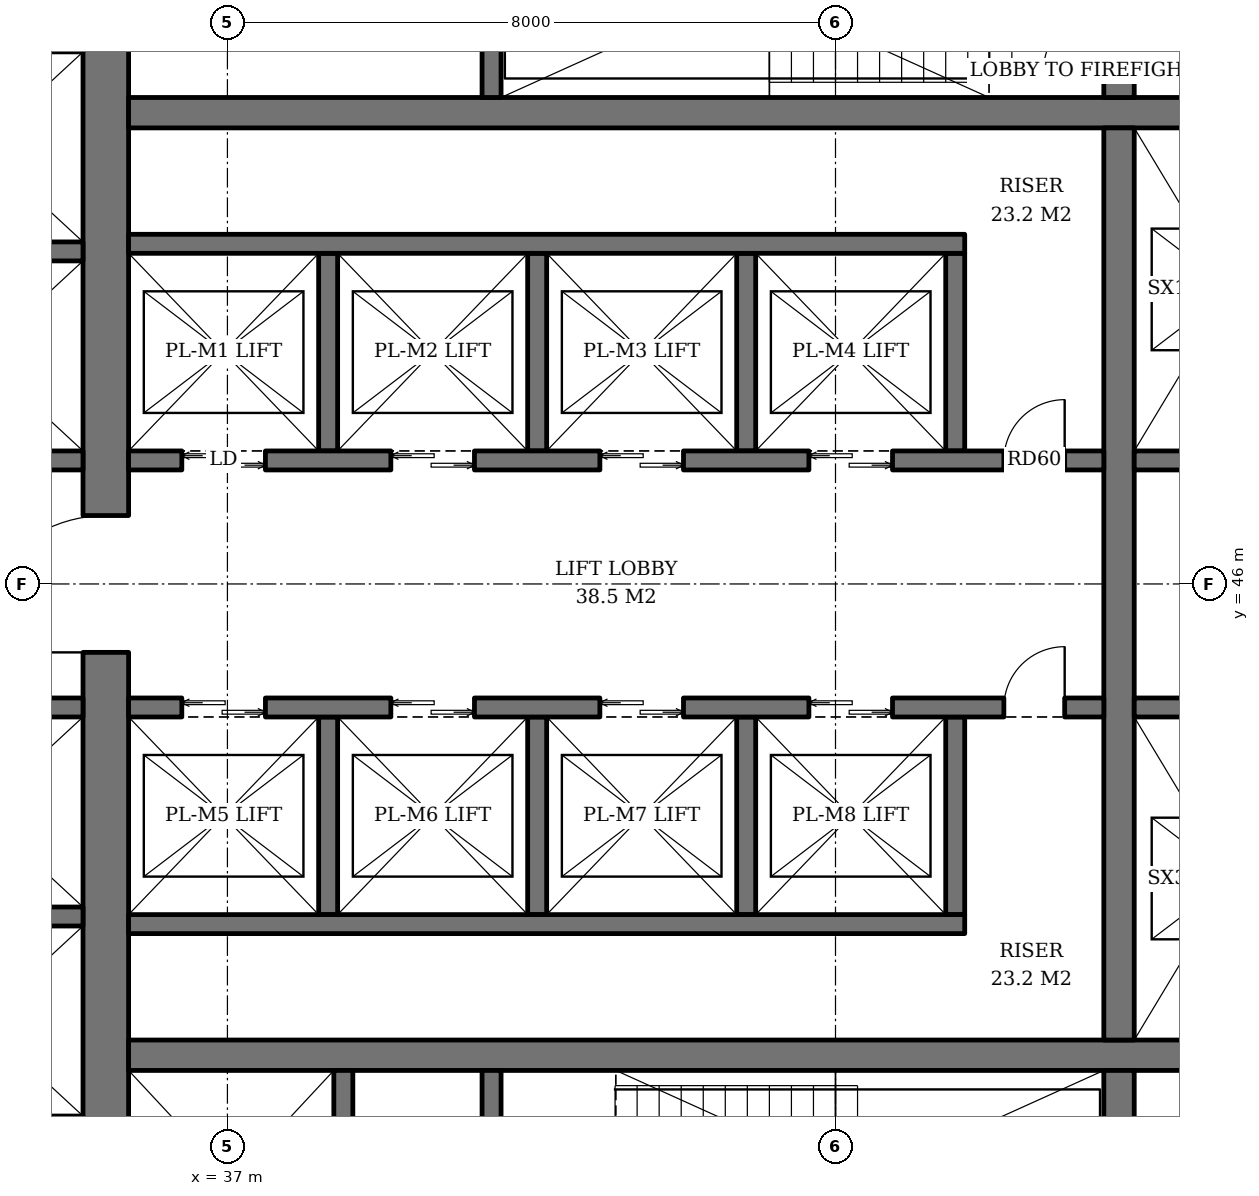
"""IFC4 building model, lengths in metres.
Left out: names, types, materials, properties, quantities, classifications, styles, units other than length and angle.
Written with IfcOpenShell. Run it as: python <this file> out.ifc"""

import sys

from ifc_helpers import new_model, si_unit, direction, frame, frame_2d, origin, place, context, subcontext, project, spatial, rectangle, extrude, element, fill, save


model = new_model("IFC4")
c1 = context("Model", 3, precision=1e-05, world=origin(), true_north=direction((0.0, 1.0)))
c2 = subcontext(c1, "Body", "Model", "MODEL_VIEW")
j1 = project(units=[si_unit("LENGTHUNIT", "METRE"), si_unit("PLANEANGLEUNIT", "RADIAN")], contexts=[c1])
p1 = place(None, origin())
s1 = spatial("IfcSite", under=j1, at=p1, CompositionType="ELEMENT")
p2 = place(p1, origin())
s2 = spatial("IfcBuilding", under=s1, at=p2, CompositionType="ELEMENT")
p3 = place(p2, frame((0.0, 0.0, 89.4)))
s3 = spatial("IfcBuildingStorey", under=s2, at=p3, CompositionType="ELEMENT", Elevation=89.4)
p4 = place(p3, frame((35.4, 36.7, 0.0), z_axis=(0.0, 0.0, 1.0), x_axis=(0.0, 1.0, 0.0)))
e1 = element("IfcWall", 1, at=p4, inside=s3, PredefinedType="SHEAR", context=c2, shape_type="SweptSolid", body=[
    extrude(rectangle(XDim=18.6, YDim=0.6, at=frame_2d((9.3, 0.0))), origin(), (0.0, 0.0, 1.0), 3.8),
])
p5 = place(p4, frame((8.4, 0.0, 0.0)))
e2 = element("IfcOpeningElement", 2, at=p5, cuts=e1, PredefinedType="OPENING", context=c2, shape_type="SweptSolid", body=[
    extrude(rectangle(XDim=1.8, YDim=2.4, at=frame_2d((0.9, 1.2))), frame((0.0, 0.31, 0.0), z_axis=(0.0, -1.0, 0.0), x_axis=(1.0, 0.0, 0.0)), (0.0, 0.0, 1.0), 0.62),
])
for number, where, z_axis, x_axis in (
    (3, (35.7, 39.8, 0.0), (0.0, 0.0, 1.0), (1.0, 0.0, 0.0)),
    (4, (35.7, 52.2, 0.0), (0.0, 0.0, 1.0), (1.0, 0.0, 0.0)),
):
    element("IfcWall", number, at=place(p3, frame(where, z_axis=z_axis, x_axis=x_axis)), inside=s3, PredefinedType="SHEAR", context=c2, shape_type="SweptSolid", body=[
        extrude(rectangle(XDim=18.6, YDim=0.4, at=frame_2d((9.3, 0.0))), origin(), (0.0, 0.0, 1.0), 3.8),
    ])
p6 = place(p3, frame((48.73, 36.7, 0.0), z_axis=(0.0, 0.0, 1.0), x_axis=(0.0, 1.0, 0.0)))
e5 = element("IfcWall", 5, at=p6, inside=s3, PredefinedType="SHEAR", context=c2, shape_type="SweptSolid", body=[
    extrude(rectangle(XDim=2.9, YDim=0.4, at=frame_2d((1.45, 0.0))), origin(), (0.0, 0.0, 1.0), 3.8),
])
p7 = place(p3, frame((48.73, 40.0, 0.0), z_axis=(0.0, 0.0, 1.0), x_axis=(0.0, 1.0, 0.0)))
e6 = element("IfcWall", 6, at=p7, inside=s3, PredefinedType="SHEAR", context=c2, shape_type="SweptSolid", body=[
    extrude(rectangle(XDim=12.0, YDim=0.4, at=frame_2d((6.0, 0.0))), origin(), (0.0, 0.0, 1.0), 3.8),
])
p8 = place(p3, frame((48.73, 52.4, 0.0), z_axis=(0.0, 0.0, 1.0), x_axis=(0.0, 1.0, 0.0)))
e7 = element("IfcWall", 7, at=p8, inside=s3, PredefinedType="SHEAR", context=c2, shape_type="SweptSolid", body=[
    extrude(rectangle(XDim=2.9, YDim=0.4, at=frame_2d((1.45, 0.0))), origin(), (0.0, 0.0, 1.0), 3.8),
])
p9 = place(p8, frame((0.3, 0.0, 0.0)))
e8 = element("IfcOpeningElement", 8, at=p9, cuts=e7, PredefinedType="OPENING", context=c2, shape_type="SweptSolid", body=[
    extrude(rectangle(XDim=1.0, YDim=2.1, at=frame_2d((0.5, 1.05))), frame((0.0, 0.21, 0.0), z_axis=(0.0, -1.0, 0.0), x_axis=(1.0, 0.0, 0.0)), (0.0, 0.0, 1.0), 0.42),
])
p10 = place(p3, frame((38.525, 36.7, 0.0), z_axis=(0.0, 0.0, 1.0), x_axis=(0.0, 1.0, 0.0)))
e9 = element("IfcWall", 9, at=p10, inside=s3, PredefinedType="SHEAR", context=c2, shape_type="SweptSolid", body=[
    extrude(rectangle(XDim=2.9, YDim=0.25, at=frame_2d((1.45, 0.0))), origin(), (0.0, 0.0, 1.0), 3.8),
])
p11 = place(p10, frame((0.8, 0.0, 0.0)))
e10 = element("IfcOpeningElement", 10, at=p11, cuts=e9, PredefinedType="OPENING", context=c2, shape_type="SweptSolid", body=[
    extrude(rectangle(XDim=1.3, YDim=2.2, at=frame_2d((0.65, 1.1))), frame((0.0, 0.135, 0.0), z_axis=(0.0, -1.0, 0.0), x_axis=(1.0, 0.0, 0.0)), (0.0, 0.0, 1.0), 0.27),
])
p12 = place(p3, frame((40.475, 36.7, 0.0), z_axis=(0.0, 0.0, 1.0), x_axis=(0.0, 1.0, 0.0)))
e11 = element("IfcWall", 11, at=p12, inside=s3, PredefinedType="SHEAR", context=c2, shape_type="SweptSolid", body=[
    extrude(rectangle(XDim=2.9, YDim=0.25, at=frame_2d((1.45, 0.0))), origin(), (0.0, 0.0, 1.0), 3.8),
])
p13 = place(p12, frame((0.75, 0.0, 0.0)))
e12 = element("IfcOpeningElement", 12, at=p13, cuts=e11, PredefinedType="OPENING", context=c2, shape_type="SweptSolid", body=[
    extrude(rectangle(XDim=1.2, YDim=2.1, at=frame_2d((0.6, 1.05))), frame((0.0, 0.135, 0.0), z_axis=(0.0, -1.0, 0.0), x_axis=(1.0, 0.0, 0.0)), (0.0, 0.0, 1.0), 0.27),
])
p14 = place(p3, frame((40.475, 52.4, 0.0), z_axis=(0.0, 0.0, 1.0), x_axis=(0.0, 1.0, 0.0)))
e13 = element("IfcWall", 13, at=p14, inside=s3, PredefinedType="SHEAR", context=c2, shape_type="SweptSolid", body=[
    extrude(rectangle(XDim=2.9, YDim=0.25, at=frame_2d((1.45, 0.0))), origin(), (0.0, 0.0, 1.0), 3.8),
])
for number, where, z_axis, x_axis in (
    (14, (38.325, 47.75, 0.0), (0.0, 0.0, 1.0), (0.0, 1.0, 0.0)),
    (15, (41.075, 47.75, 0.0), (0.0, 0.0, 1.0), (0.0, 1.0, 0.0)),
    (16, (43.825, 47.75, 0.0), (0.0, 0.0, 1.0), (0.0, 1.0, 0.0)),
    (17, (46.575, 47.75, 0.0), (0.0, 0.0, 1.0), (0.0, 1.0, 0.0)),
):
    element("IfcWall", number, at=place(p3, frame(where, z_axis=z_axis, x_axis=x_axis)), inside=s3, PredefinedType="SHEAR", context=c2, shape_type="SweptSolid", body=[
        extrude(rectangle(XDim=2.6, YDim=0.25, at=frame_2d((1.3, 0.0))), origin(), (0.0, 0.0, 1.0), 3.8),
    ])
p15 = place(p3, frame((35.7, 50.475, 0.0), z_axis=(0.0, 0.0, 1.0), x_axis=(1.0, 0.0, 0.0)))
e18 = element("IfcWall", 18, at=p15, inside=s3, PredefinedType="SHEAR", context=c2, shape_type="SweptSolid", body=[
    extrude(rectangle(XDim=11.0, YDim=0.25, at=frame_2d((5.5, 0.0))), origin(), (0.0, 0.0, 1.0), 3.8),
])
p16 = place(p3, frame((35.7, 47.625, 0.0), z_axis=(0.0, 0.0, 1.0), x_axis=(1.0, 0.0, 0.0)))
e19 = element("IfcWall", 19, at=p16, inside=s3, PredefinedType="SHEAR", context=c2, shape_type="SweptSolid", body=[
    extrude(rectangle(XDim=12.83, YDim=0.25, at=frame_2d((6.415, 0.0))), origin(), (0.0, 0.0, 1.0), 3.8),
])
p17 = place(p16, frame((0.7, 0.0, 0.0)))
e20 = element("IfcOpeningElement", 20, at=p17, cuts=e19, PredefinedType="OPENING", context=c2, shape_type="SweptSolid", body=[
    extrude(rectangle(XDim=1.1, YDim=2.2, at=frame_2d((0.55, 1.1))), frame((0.0, 0.135, 0.0), z_axis=(0.0, -1.0, 0.0), x_axis=(1.0, 0.0, 0.0)), (0.0, 0.0, 1.0), 0.27),
])
p18 = place(p16, frame((3.45, 0.0, 0.0)))
e21 = element("IfcOpeningElement", 21, at=p18, cuts=e19, PredefinedType="OPENING", context=c2, shape_type="SweptSolid", body=[
    extrude(rectangle(XDim=1.1, YDim=2.2, at=frame_2d((0.55, 1.1))), frame((0.0, 0.135, 0.0), z_axis=(0.0, -1.0, 0.0), x_axis=(1.0, 0.0, 0.0)), (0.0, 0.0, 1.0), 0.27),
])
p19 = place(p16, frame((6.2, 0.0, 0.0)))
e22 = element("IfcOpeningElement", 22, at=p19, cuts=e19, PredefinedType="OPENING", context=c2, shape_type="SweptSolid", body=[
    extrude(rectangle(XDim=1.1, YDim=2.2, at=frame_2d((0.55, 1.1))), frame((0.0, 0.135, 0.0), z_axis=(0.0, -1.0, 0.0), x_axis=(1.0, 0.0, 0.0)), (0.0, 0.0, 1.0), 0.27),
])
p20 = place(p16, frame((8.95, 0.0, 0.0)))
e23 = element("IfcOpeningElement", 23, at=p20, cuts=e19, PredefinedType="OPENING", context=c2, shape_type="SweptSolid", body=[
    extrude(rectangle(XDim=1.1, YDim=2.2, at=frame_2d((0.55, 1.1))), frame((0.0, 0.135, 0.0), z_axis=(0.0, -1.0, 0.0), x_axis=(1.0, 0.0, 0.0)), (0.0, 0.0, 1.0), 0.27),
])
p21 = place(p16, frame((11.515, 0.0, 0.0)))
e24 = element("IfcOpeningElement", 24, at=p21, cuts=e19, PredefinedType="OPENING", context=c2, shape_type="SweptSolid", body=[
    extrude(rectangle(XDim=0.8, YDim=2.0, at=frame_2d((0.4, 1.0))), frame((0.0, 0.135, 0.0), z_axis=(0.0, -1.0, 0.0), x_axis=(1.0, 0.0, 0.0)), (0.0, 0.0, 1.0), 0.27),
])
for number, where, z_axis, x_axis in (
    (25, (38.325, 44.25, 0.0), (0.0, 0.0, 1.0), (0.0, -1.0, 0.0)),
    (26, (41.075, 44.25, 0.0), (0.0, 0.0, 1.0), (0.0, -1.0, 0.0)),
    (27, (43.825, 44.25, 0.0), (0.0, 0.0, 1.0), (0.0, -1.0, 0.0)),
    (28, (46.575, 44.25, 0.0), (0.0, 0.0, 1.0), (0.0, -1.0, 0.0)),
):
    element("IfcWall", number, at=place(p3, frame(where, z_axis=z_axis, x_axis=x_axis)), inside=s3, PredefinedType="SHEAR", context=c2, shape_type="SweptSolid", body=[
        extrude(rectangle(XDim=2.6, YDim=0.25, at=frame_2d((1.3, 0.0))), origin(), (0.0, 0.0, 1.0), 3.8),
    ])
p22 = place(p3, frame((35.7, 41.525, 0.0), z_axis=(0.0, 0.0, 1.0), x_axis=(1.0, 0.0, 0.0)))
e29 = element("IfcWall", 29, at=p22, inside=s3, PredefinedType="SHEAR", context=c2, shape_type="SweptSolid", body=[
    extrude(rectangle(XDim=11.0, YDim=0.25, at=frame_2d((5.5, 0.0))), origin(), (0.0, 0.0, 1.0), 3.8),
])
p23 = place(p3, frame((35.7, 44.375, 0.0), z_axis=(0.0, 0.0, 1.0), x_axis=(1.0, 0.0, 0.0)))
e30 = element("IfcWall", 30, at=p23, inside=s3, PredefinedType="SHEAR", context=c2, shape_type="SweptSolid", body=[
    extrude(rectangle(XDim=12.83, YDim=0.25, at=frame_2d((6.415, 0.0))), origin(), (0.0, 0.0, 1.0), 3.8),
])
p24 = place(p23, frame((0.7, 0.0, 0.0)))
e31 = element("IfcOpeningElement", 31, at=p24, cuts=e30, PredefinedType="OPENING", context=c2, shape_type="SweptSolid", body=[
    extrude(rectangle(XDim=1.1, YDim=2.2, at=frame_2d((0.55, 1.1))), frame((0.0, 0.135, 0.0), z_axis=(0.0, -1.0, 0.0), x_axis=(1.0, 0.0, 0.0)), (0.0, 0.0, 1.0), 0.27),
])
p25 = place(p23, frame((3.45, 0.0, 0.0)))
e32 = element("IfcOpeningElement", 32, at=p25, cuts=e30, PredefinedType="OPENING", context=c2, shape_type="SweptSolid", body=[
    extrude(rectangle(XDim=1.1, YDim=2.2, at=frame_2d((0.55, 1.1))), frame((0.0, 0.135, 0.0), z_axis=(0.0, -1.0, 0.0), x_axis=(1.0, 0.0, 0.0)), (0.0, 0.0, 1.0), 0.27),
])
p26 = place(p23, frame((6.2, 0.0, 0.0)))
e33 = element("IfcOpeningElement", 33, at=p26, cuts=e30, PredefinedType="OPENING", context=c2, shape_type="SweptSolid", body=[
    extrude(rectangle(XDim=1.1, YDim=2.2, at=frame_2d((0.55, 1.1))), frame((0.0, 0.135, 0.0), z_axis=(0.0, -1.0, 0.0), x_axis=(1.0, 0.0, 0.0)), (0.0, 0.0, 1.0), 0.27),
])
p27 = place(p23, frame((8.95, 0.0, 0.0)))
e34 = element("IfcOpeningElement", 34, at=p27, cuts=e30, PredefinedType="OPENING", context=c2, shape_type="SweptSolid", body=[
    extrude(rectangle(XDim=1.1, YDim=2.2, at=frame_2d((0.55, 1.1))), frame((0.0, 0.135, 0.0), z_axis=(0.0, -1.0, 0.0), x_axis=(1.0, 0.0, 0.0)), (0.0, 0.0, 1.0), 0.27),
])
p28 = place(p23, frame((11.515, 0.0, 0.0)))
e35 = element("IfcOpeningElement", 35, at=p28, cuts=e30, PredefinedType="OPENING", context=c2, shape_type="SweptSolid", body=[
    extrude(rectangle(XDim=0.8, YDim=2.0, at=frame_2d((0.4, 1.0))), frame((0.0, 0.135, 0.0), z_axis=(0.0, -1.0, 0.0), x_axis=(1.0, 0.0, 0.0)), (0.0, 0.0, 1.0), 0.27),
])
for number, where, z_axis, x_axis in (
    (36, (48.93, 47.625, 0.0), (0.0, 0.0, 1.0), (1.0, 0.0, 0.0)),
    (37, (48.93, 44.375, 0.0), (0.0, 0.0, 1.0), (1.0, 0.0, 0.0)),
):
    element("IfcWall", number, at=place(p3, frame(where, z_axis=z_axis, x_axis=x_axis)), inside=s3, PredefinedType="SHEAR", context=c2, shape_type="SweptSolid", body=[
        extrude(rectangle(XDim=5.37, YDim=0.25, at=frame_2d((2.685, 0.0))), origin(), (0.0, 0.0, 1.0), 3.8),
    ])
for number, where, z_axis, x_axis in (
    (38, (32.4, 41.625, 0.0), (0.0, 0.0, 1.0), (1.0, 0.0, 0.0)),
    (39, (32.4, 44.375, 0.0), (0.0, 0.0, 1.0), (1.0, 0.0, 0.0)),
    (40, (32.4, 47.625, 0.0), (0.0, 0.0, 1.0), (1.0, 0.0, 0.0)),
    (41, (32.4, 50.375, 0.0), (0.0, 0.0, 1.0), (1.0, 0.0, 0.0)),
):
    element("IfcWall", number, at=place(p3, frame(where, z_axis=z_axis, x_axis=x_axis)), inside=s3, PredefinedType="SHEAR", context=c2, shape_type="SweptSolid", body=[
        extrude(rectangle(XDim=2.7, YDim=0.25, at=frame_2d((1.35, 0.0))), origin(), (0.0, 0.0, 1.0), 3.8),
    ])
p29 = place(p17, origin())
e42 = element("IfcDoor", 42, at=p29, inside=s3, OperationType="DOUBLE_DOOR_SLIDING", PredefinedType="DOOR", context=c2, shape_type="SweptSolid", body=[
    extrude(rectangle(XDim=1.1, YDim=2.2, at=frame_2d((0.55, 1.1))), frame((0.0, 0.025, 0.0), z_axis=(0.0, -1.0, 0.0), x_axis=(1.0, 0.0, 0.0)), (0.0, 0.0, 1.0), 0.05),
])
fill(e20, e42)
p30 = place(p18, origin())
e43 = element("IfcDoor", 43, at=p30, inside=s3, OperationType="DOUBLE_DOOR_SLIDING", PredefinedType="DOOR", context=c2, shape_type="SweptSolid", body=[
    extrude(rectangle(XDim=1.1, YDim=2.2, at=frame_2d((0.55, 1.1))), frame((0.0, 0.025, 0.0), z_axis=(0.0, -1.0, 0.0), x_axis=(1.0, 0.0, 0.0)), (0.0, 0.0, 1.0), 0.05),
])
fill(e21, e43)
p31 = place(p19, origin())
e44 = element("IfcDoor", 44, at=p31, inside=s3, OperationType="DOUBLE_DOOR_SLIDING", PredefinedType="DOOR", context=c2, shape_type="SweptSolid", body=[
    extrude(rectangle(XDim=1.1, YDim=2.2, at=frame_2d((0.55, 1.1))), frame((0.0, 0.025, 0.0), z_axis=(0.0, -1.0, 0.0), x_axis=(1.0, 0.0, 0.0)), (0.0, 0.0, 1.0), 0.05),
])
fill(e22, e44)
p32 = place(p20, origin())
e45 = element("IfcDoor", 45, at=p32, inside=s3, OperationType="DOUBLE_DOOR_SLIDING", PredefinedType="DOOR", context=c2, shape_type="SweptSolid", body=[
    extrude(rectangle(XDim=1.1, YDim=2.2, at=frame_2d((0.55, 1.1))), frame((0.0, 0.025, 0.0), z_axis=(0.0, -1.0, 0.0), x_axis=(1.0, 0.0, 0.0)), (0.0, 0.0, 1.0), 0.05),
])
fill(e23, e45)
p33 = place(p21, origin())
e46 = element("IfcDoor", 46, at=p33, inside=s3, OperationType="SINGLE_SWING_RIGHT", PredefinedType="DOOR", context=c2, shape_type="SweptSolid", body=[
    extrude(rectangle(XDim=0.8, YDim=2.0, at=frame_2d((0.4, 1.0))), frame((0.0, 0.025, 0.0), z_axis=(0.0, -1.0, 0.0), x_axis=(1.0, 0.0, 0.0)), (0.0, 0.0, 1.0), 0.05),
])
fill(e24, e46)
p34 = place(p24, origin())
e47 = element("IfcDoor", 47, at=p34, inside=s3, OperationType="DOUBLE_DOOR_SLIDING", PredefinedType="DOOR", context=c2, shape_type="SweptSolid", body=[
    extrude(rectangle(XDim=1.1, YDim=2.2, at=frame_2d((0.55, 1.1))), frame((0.0, 0.025, 0.0), z_axis=(0.0, -1.0, 0.0), x_axis=(1.0, 0.0, 0.0)), (0.0, 0.0, 1.0), 0.05),
])
fill(e31, e47)
p35 = place(p25, origin())
e48 = element("IfcDoor", 48, at=p35, inside=s3, OperationType="DOUBLE_DOOR_SLIDING", PredefinedType="DOOR", context=c2, shape_type="SweptSolid", body=[
    extrude(rectangle(XDim=1.1, YDim=2.2, at=frame_2d((0.55, 1.1))), frame((0.0, 0.025, 0.0), z_axis=(0.0, -1.0, 0.0), x_axis=(1.0, 0.0, 0.0)), (0.0, 0.0, 1.0), 0.05),
])
fill(e32, e48)
p36 = place(p26, origin())
e49 = element("IfcDoor", 49, at=p36, inside=s3, OperationType="DOUBLE_DOOR_SLIDING", PredefinedType="DOOR", context=c2, shape_type="SweptSolid", body=[
    extrude(rectangle(XDim=1.1, YDim=2.2, at=frame_2d((0.55, 1.1))), frame((0.0, 0.025, 0.0), z_axis=(0.0, -1.0, 0.0), x_axis=(1.0, 0.0, 0.0)), (0.0, 0.0, 1.0), 0.05),
])
fill(e33, e49)
p37 = place(p27, origin())
e50 = element("IfcDoor", 50, at=p37, inside=s3, OperationType="DOUBLE_DOOR_SLIDING", PredefinedType="DOOR", context=c2, shape_type="SweptSolid", body=[
    extrude(rectangle(XDim=1.1, YDim=2.2, at=frame_2d((0.55, 1.1))), frame((0.0, 0.025, 0.0), z_axis=(0.0, -1.0, 0.0), x_axis=(1.0, 0.0, 0.0)), (0.0, 0.0, 1.0), 0.05),
])
fill(e34, e50)
p38 = place(p28, origin())
e51 = element("IfcDoor", 51, at=p38, inside=s3, OperationType="SINGLE_SWING_RIGHT", PredefinedType="DOOR", context=c2, shape_type="SweptSolid", body=[
    extrude(rectangle(XDim=0.8, YDim=2.0, at=frame_2d((0.4, 1.0))), frame((0.0, 0.025, 0.0), z_axis=(0.0, -1.0, 0.0), x_axis=(1.0, 0.0, 0.0)), (0.0, 0.0, 1.0), 0.05),
])
fill(e35, e51)
p39 = place(p9, origin())
e52 = element("IfcDoor", 52, at=p39, inside=s3, OperationType="SINGLE_SWING_LEFT", PredefinedType="DOOR", context=c2, shape_type="SweptSolid", body=[
    extrude(rectangle(XDim=1.0, YDim=2.1, at=frame_2d((0.5, 1.05))), frame((0.0, 0.025, 0.0), z_axis=(0.0, -1.0, 0.0), x_axis=(1.0, 0.0, 0.0)), (0.0, 0.0, 1.0), 0.05),
])
fill(e8, e52)
p40 = place(p5, origin())
e53 = element("IfcDoor", 53, at=p40, inside=s3, OperationType="DOUBLE_DOOR_SINGLE_SWING", PredefinedType="DOOR", context=c2, shape_type="SweptSolid", body=[
    extrude(rectangle(XDim=1.8, YDim=2.4, at=frame_2d((0.9, 1.2))), frame((0.0, 0.025, 0.0), z_axis=(0.0, -1.0, 0.0), x_axis=(1.0, 0.0, 0.0)), (0.0, 0.0, 1.0), 0.05),
])
fill(e2, e53)
save(model, sys.argv[1])
